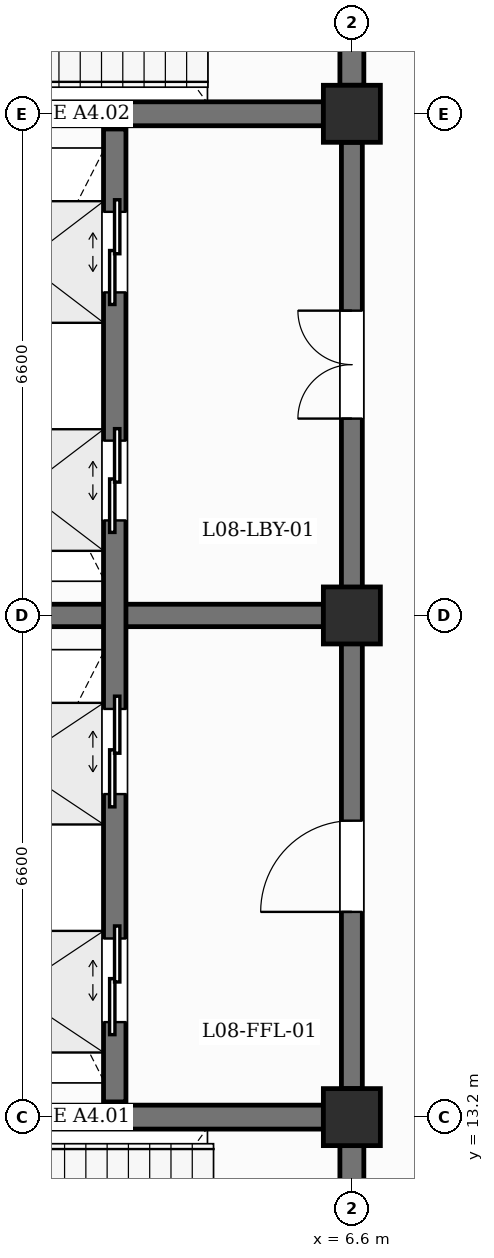
"""IFC4 building model, lengths in metres.
Left out: names, types, materials, properties, quantities, classifications, styles, units other than length and angle.
Written with IfcOpenShell. Run it as: python <this file> out.ifc"""

import sys

from ifc_helpers import new_model, si_unit, direction, frame, frame_2d, origin, origin_2d, place, context, subcontext, project, spatial, rectangle, extrude, element, fill, save


model = new_model("IFC4")
c1 = context("Model", 3, precision=1e-05, world=origin(), true_north=direction((0.0, 1.0)))
c2 = subcontext(c1, "Body", "Model", "MODEL_VIEW")
j1 = project(units=[si_unit("LENGTHUNIT", "METRE"), si_unit("PLANEANGLEUNIT", "RADIAN")], contexts=[c1])
p1 = place(None, origin())
s1 = spatial("IfcSite", under=j1, at=p1, CompositionType="ELEMENT")
p2 = place(p1, origin())
s2 = spatial("IfcBuilding", under=s1, at=p2, CompositionType="ELEMENT")
p3 = place(p2, frame((0.0, 0.0, 35.4)))
s3 = spatial("IfcBuildingStorey", under=s2, at=p3, CompositionType="ELEMENT", Elevation=35.4)
for number, where, z_axis, x_axis in (
    (1, (6.6, 13.2, 0.0), (0.0, 0.0, 1.0), (1.0, 0.0, 0.0)),
    (2, (6.6, 19.8, 0.0), (0.0, 0.0, 1.0), (1.0, 0.0, 0.0)),
    (3, (6.6, 26.4, 0.0), (0.0, 0.0, 1.0), (1.0, 0.0, 0.0)),
):
    element("IfcColumn", number, at=place(p3, frame(where, z_axis=z_axis, x_axis=x_axis)), inside=s3, PredefinedType="COLUMN", context=c2, shape_type="SweptSolid", body=[
        extrude(rectangle(XDim=0.75, YDim=0.75, at=origin_2d()), origin(), (0.0, 0.0, 1.0), 4.2),
    ])
p4 = place(p3, frame((0.375, 13.2, 0.0), z_axis=(0.0, 0.0, 1.0), x_axis=(1.0, 0.0, 0.0)))
e4 = element("IfcWall", 4, at=p4, inside=s3, PredefinedType="SHEAR", context=c2, shape_type="SweptSolid", body=[
    extrude(rectangle(XDim=5.85, YDim=0.315, at=frame_2d((2.925, 0.0))), origin(), (0.0, 0.0, 1.0), 3.18),
])
p5 = place(p3, frame((6.6, 6.975, 0.0), z_axis=(0.0, 0.0, 1.0), x_axis=(0.0, 1.0, 0.0)))
e5 = element("IfcWall", 5, at=p5, inside=s3, PredefinedType="SHEAR", context=c2, shape_type="SweptSolid", body=[
    extrude(rectangle(XDim=5.85, YDim=0.315, at=frame_2d((2.925, 0.0))), origin(), (0.0, 0.0, 1.0), 3.18),
])
p6 = place(p5, frame((2.35, 0.0, 0.0)))
e6 = element("IfcOpeningElement", 6, at=p6, cuts=e5, PredefinedType="OPENING", context=c2, shape_type="SweptSolid", body=[
    extrude(rectangle(XDim=1.15, YDim=2.2, at=frame_2d((0.575, 1.1))), frame((0.0, 0.167, 0.0), z_axis=(0.0, -1.0, 0.0), x_axis=(1.0, 0.0, 0.0)), (0.0, 0.0, 1.0), 0.335),
])
p7 = place(p3, frame((0.375, 26.4, 0.0), z_axis=(0.0, 0.0, 1.0), x_axis=(1.0, 0.0, 0.0)))
e7 = element("IfcWall", 7, at=p7, inside=s3, PredefinedType="SHEAR", context=c2, shape_type="SweptSolid", body=[
    extrude(rectangle(XDim=5.85, YDim=0.315, at=frame_2d((2.925, 0.0))), origin(), (0.0, 0.0, 1.0), 3.18),
])
p8 = place(p3, frame((6.6, 26.775, 0.0), z_axis=(0.0, 0.0, 1.0), x_axis=(0.0, 1.0, 0.0)))
e8 = element("IfcWall", 8, at=p8, inside=s3, PredefinedType="SHEAR", context=c2, shape_type="SweptSolid", body=[
    extrude(rectangle(XDim=5.875, YDim=0.315, at=frame_2d((2.938, 0.0))), origin(), (0.0, 0.0, 1.0), 3.18),
])
p9 = place(p8, frame((2.363, 0.0, 0.0)))
e9 = element("IfcOpeningElement", 9, at=p9, cuts=e8, PredefinedType="OPENING", context=c2, shape_type="SweptSolid", body=[
    extrude(rectangle(XDim=1.15, YDim=2.2, at=frame_2d((0.575, 1.1))), frame((0.0, 0.167, 0.0), z_axis=(0.0, -1.0, 0.0), x_axis=(1.0, 0.0, 0.0)), (0.0, 0.0, 1.0), 0.335),
])
p10 = place(p3, frame((0.375, 19.8, 0.0), z_axis=(0.0, 0.0, 1.0), x_axis=(1.0, 0.0, 0.0)))
e10 = element("IfcWall", 10, at=p10, inside=s3, PredefinedType="SHEAR", context=c2, shape_type="SweptSolid", body=[
    extrude(rectangle(XDim=5.85, YDim=0.295, at=frame_2d((2.925, 0.0))), origin(), (0.0, 0.0, 1.0), 3.18),
])
p11 = place(p3, frame((6.6, 13.575, 0.0), z_axis=(0.0, 0.0, 1.0), x_axis=(0.0, 1.0, 0.0)))
e11 = element("IfcWall", 11, at=p11, inside=s3, PredefinedType="SHEAR", context=c2, shape_type="SweptSolid", body=[
    extrude(rectangle(XDim=5.85, YDim=0.275, at=frame_2d((2.925, 0.0))), origin(), (0.0, 0.0, 1.0), 3.18),
])
p12 = place(p11, frame((2.325, 0.0, 0.0)))
e12 = element("IfcOpeningElement", 12, at=p12, cuts=e11, PredefinedType="OPENING", context=c2, shape_type="SweptSolid", body=[
    extrude(rectangle(XDim=1.2, YDim=2.25, at=frame_2d((0.6, 1.125))), frame((0.0, 0.147, 0.0), z_axis=(0.0, -1.0, 0.0), x_axis=(1.0, 0.0, 0.0)), (0.0, 0.0, 1.0), 0.295),
])
p13 = place(p3, frame((6.6, 20.175, 0.0), z_axis=(0.0, 0.0, 1.0), x_axis=(0.0, 1.0, 0.0)))
e13 = element("IfcWall", 13, at=p13, inside=s3, PredefinedType="SHEAR", context=c2, shape_type="SweptSolid", body=[
    extrude(rectangle(XDim=5.85, YDim=0.275, at=frame_2d((2.925, 0.0))), origin(), (0.0, 0.0, 1.0), 3.18),
])
p14 = place(p13, frame((2.215, 0.0, 0.0)))
e14 = element("IfcOpeningElement", 14, at=p14, cuts=e13, PredefinedType="OPENING", context=c2, shape_type="SweptSolid", body=[
    extrude(rectangle(XDim=1.42, YDim=2.2, at=frame_2d((0.71, 1.1))), frame((0.0, 0.147, 0.0), z_axis=(0.0, -1.0, 0.0), x_axis=(1.0, 0.0, 0.0)), (0.0, 0.0, 1.0), 0.295),
])
p15 = place(p3, frame((3.48, 13.4, 0.0), z_axis=(0.0, 0.0, 1.0), x_axis=(0.0, 1.0, 0.0)))
e15 = element("IfcWall", 15, at=p15, inside=s3, PredefinedType="SHEAR", context=c2, shape_type="SweptSolid", body=[
    extrude(rectangle(XDim=6.2, YDim=0.295, at=frame_2d((3.1, 0.0))), origin(), (0.0, 0.0, 1.0), 3.88),
])
p16 = place(p15, frame((1.05, 0.0, 0.0)))
e16 = element("IfcOpeningElement", 16, at=p16, cuts=e15, PredefinedType="OPENING", context=c2, shape_type="SweptSolid", body=[
    extrude(rectangle(XDim=1.1, YDim=2.15, at=frame_2d((0.55, 1.075))), frame((0.0, 0.157, 0.0), z_axis=(0.0, -1.0, 0.0), x_axis=(1.0, 0.0, 0.0)), (0.0, 0.0, 1.0), 0.315),
])
p17 = place(p15, frame((4.05, 0.0, 0.0)))
e17 = element("IfcOpeningElement", 17, at=p17, cuts=e15, PredefinedType="OPENING", context=c2, shape_type="SweptSolid", body=[
    extrude(rectangle(XDim=1.12, YDim=2.15, at=frame_2d((0.56, 1.075))), frame((0.0, 0.157, 0.0), z_axis=(0.0, -1.0, 0.0), x_axis=(1.0, 0.0, 0.0)), (0.0, 0.0, 1.0), 0.315),
])
p18 = place(p3, frame((3.48, 20.0, 0.0), z_axis=(0.0, 0.0, 1.0), x_axis=(0.0, 1.0, 0.0)))
e18 = element("IfcWall", 18, at=p18, inside=s3, PredefinedType="SHEAR", context=c2, shape_type="SweptSolid", body=[
    extrude(rectangle(XDim=6.2, YDim=0.295, at=frame_2d((3.1, 0.0))), origin(), (0.0, 0.0, 1.0), 3.88),
])
p19 = place(p18, frame((1.05, 0.0, 0.0)))
e19 = element("IfcOpeningElement", 19, at=p19, cuts=e18, PredefinedType="OPENING", context=c2, shape_type="SweptSolid", body=[
    extrude(rectangle(XDim=1.05, YDim=2.15, at=frame_2d((0.525, 1.075))), frame((0.0, 0.157, 0.0), z_axis=(0.0, -1.0, 0.0), x_axis=(1.0, 0.0, 0.0)), (0.0, 0.0, 1.0), 0.315),
])
p20 = place(p18, frame((4.05, 0.0, 0.0)))
e20 = element("IfcOpeningElement", 20, at=p20, cuts=e18, PredefinedType="OPENING", context=c2, shape_type="SweptSolid", body=[
    extrude(rectangle(XDim=1.06, YDim=2.15, at=frame_2d((0.53, 1.075))), frame((0.0, 0.157, 0.0), z_axis=(0.0, -1.0, 0.0), x_axis=(1.0, 0.0, 0.0)), (0.0, 0.0, 1.0), 0.315),
])
p21 = place(p16, origin())
e21 = element("IfcDoor", 21, at=p21, inside=s3, OperationType="DOUBLE_DOOR_SLIDING", PredefinedType="USERDEFINED", context=c2, shape_type="SweptSolid", body=[
    extrude(rectangle(XDim=1.1, YDim=2.15, at=frame_2d((0.55, 1.075))), frame((0.0, 0.025, 0.0), z_axis=(0.0, -1.0, 0.0), x_axis=(1.0, 0.0, 0.0)), (0.0, 0.0, 1.0), 0.05),
])
fill(e16, e21)
p22 = place(p17, origin())
e22 = element("IfcDoor", 22, at=p22, inside=s3, OperationType="DOUBLE_DOOR_SLIDING", PredefinedType="USERDEFINED", context=c2, shape_type="SweptSolid", body=[
    extrude(rectangle(XDim=1.12, YDim=2.15, at=frame_2d((0.56, 1.075))), frame((0.0, 0.025, 0.0), z_axis=(0.0, -1.0, 0.0), x_axis=(1.0, 0.0, 0.0)), (0.0, 0.0, 1.0), 0.05),
])
fill(e17, e22)
p23 = place(p19, origin())
e23 = element("IfcDoor", 23, at=p23, inside=s3, OperationType="DOUBLE_DOOR_SLIDING", PredefinedType="USERDEFINED", context=c2, shape_type="SweptSolid", body=[
    extrude(rectangle(XDim=1.05, YDim=2.15, at=frame_2d((0.525, 1.075))), frame((0.0, 0.025, 0.0), z_axis=(0.0, -1.0, 0.0), x_axis=(1.0, 0.0, 0.0)), (0.0, 0.0, 1.0), 0.05),
])
fill(e19, e23)
p24 = place(p20, origin())
e24 = element("IfcDoor", 24, at=p24, inside=s3, OperationType="DOUBLE_DOOR_SLIDING", PredefinedType="USERDEFINED", context=c2, shape_type="SweptSolid", body=[
    extrude(rectangle(XDim=1.06, YDim=2.15, at=frame_2d((0.53, 1.075))), frame((0.0, 0.025, 0.0), z_axis=(0.0, -1.0, 0.0), x_axis=(1.0, 0.0, 0.0)), (0.0, 0.0, 1.0), 0.05),
])
fill(e20, e24)
p25 = place(p12, origin())
e25 = element("IfcDoor", 25, at=p25, inside=s3, OperationType="SINGLE_SWING_LEFT", PredefinedType="DOOR", context=c2, shape_type="SweptSolid", body=[
    extrude(rectangle(XDim=1.2, YDim=2.25, at=frame_2d((0.6, 1.125))), frame((0.0, 0.025, 0.0), z_axis=(0.0, -1.0, 0.0), x_axis=(1.0, 0.0, 0.0)), (0.0, 0.0, 1.0), 0.05),
])
fill(e12, e25)
p26 = place(p14, origin())
e26 = element("IfcDoor", 26, at=p26, inside=s3, OperationType="DOUBLE_DOOR_SINGLE_SWING", PredefinedType="DOOR", context=c2, shape_type="SweptSolid", body=[
    extrude(rectangle(XDim=1.42, YDim=2.2, at=frame_2d((0.71, 1.1))), frame((0.0, 0.025, 0.0), z_axis=(0.0, -1.0, 0.0), x_axis=(1.0, 0.0, 0.0)), (0.0, 0.0, 1.0), 0.05),
])
fill(e14, e26)
save(model, sys.argv[1])
